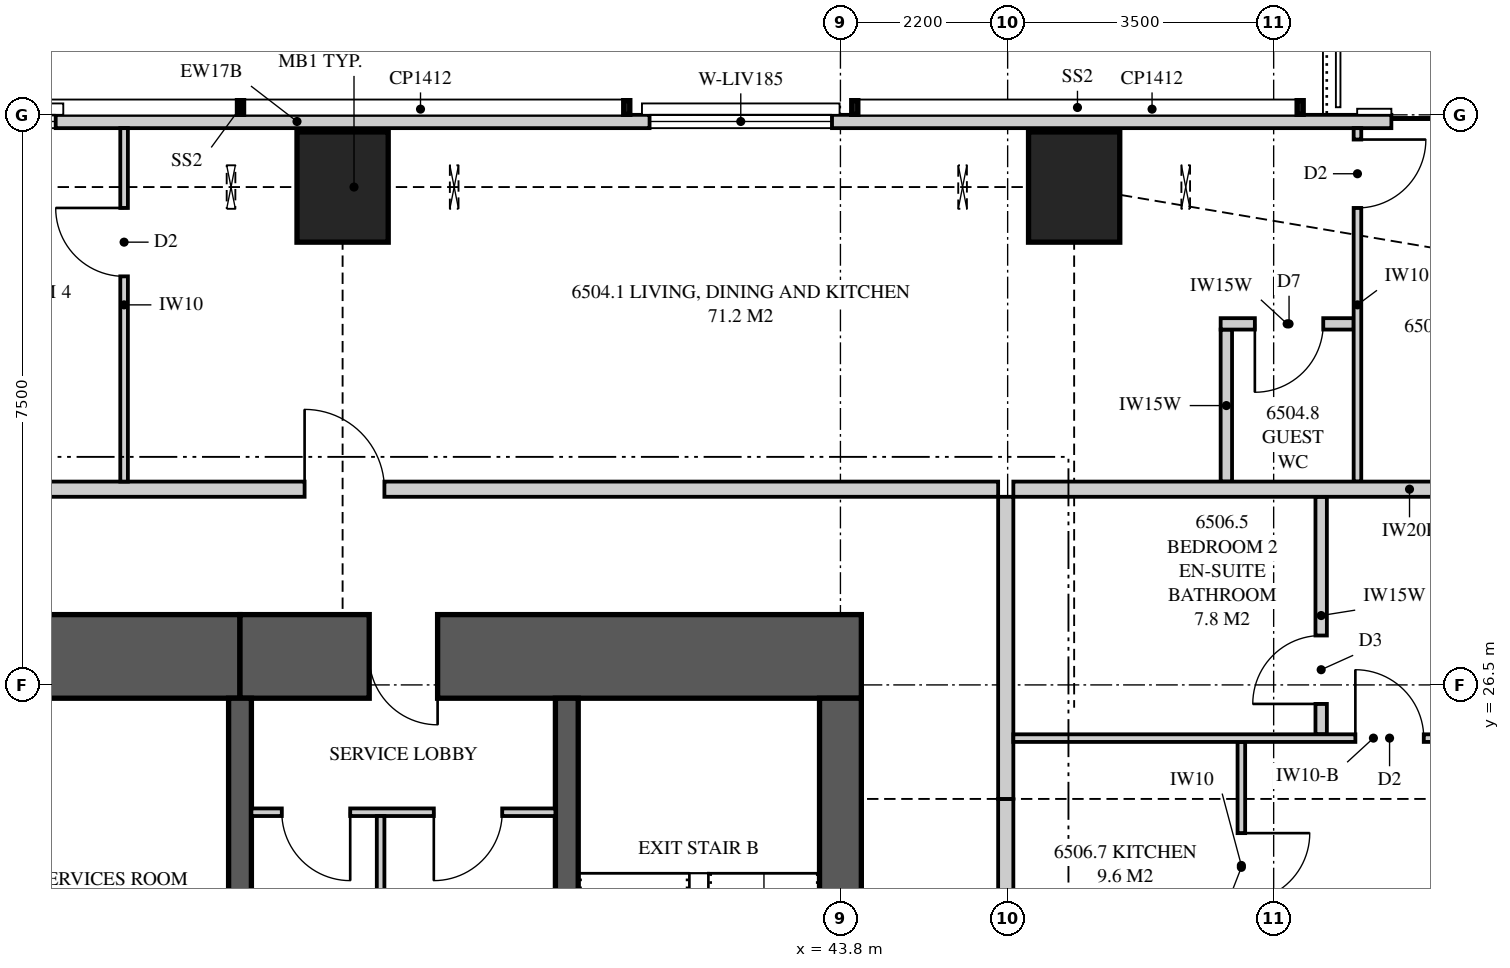
"""IFC4 building model, lengths in metres.
Left out: names, types, materials, properties, quantities, classifications, styles, units other than length and angle.
Written with IfcOpenShell. Run it as: python <this file> out.ifc"""

import sys

from ifc_helpers import new_model, si_unit, direction, frame, frame_2d, origin, origin_2d, place, context, subcontext, project, spatial, polyline, rectangle, outline, extrude, element, fill, save


model = new_model("IFC4")
c1 = context("Model", 3, precision=1e-05, world=origin(), true_north=direction((0.0, 1.0)))
c2 = subcontext(c1, "Body", "Model", "MODEL_VIEW")
j1 = project(units=[si_unit("LENGTHUNIT", "METRE"), si_unit("PLANEANGLEUNIT", "RADIAN")], contexts=[c1])
p1 = place(None, origin())
s1 = spatial("IfcSite", under=j1, at=p1, CompositionType="ELEMENT")
p2 = place(p1, origin())
s2 = spatial("IfcBuilding", under=s1, at=p2, CompositionType="ELEMENT")
p3 = place(p2, frame((0.0, 0.0, 238.95)))
s3 = spatial("IfcBuildingStorey", under=s2, at=p3, CompositionType="ELEMENT", Elevation=238.95)
for number, where, z_axis, x_axis in (
    (1, (46.875, 33.05, 0.0), (0.0, 0.0, 1.0), (0.0, 1.0, 0.0)),
    (2, (37.25, 33.05, 0.0), (0.0, 0.0, 1.0), (0.0, 1.0, 0.0)),
):
    element("IfcColumn", number, at=place(p3, frame(where, z_axis=z_axis, x_axis=x_axis)), inside=s3, PredefinedType="COLUMN", context=c2, shape_type="SweptSolid", body=[
        extrude(rectangle(XDim=1.45, YDim=1.2, at=origin_2d()), origin(), (0.0, 0.0, 1.0), 3.5),
    ])
p4 = place(p3, frame((44.075, 26.875, 0.0), z_axis=(0.0, 0.0, 1.0), x_axis=(-1.0, 0.0, 0.0)))
e3 = element("IfcWall", 3, at=p4, inside=s3, PredefinedType="SHEAR", context=c2, shape_type="SweptSolid", body=[
    extrude(rectangle(XDim=8.175, YDim=1.1, at=frame_2d((4.087, 0.0))), origin(), (0.0, 0.0, 1.0), 3.5),
])
p5 = place(p4, frame((5.575, 0.0, 0.0)))
e4 = element("IfcOpeningElement", 4, at=p5, cuts=e3, PredefinedType="OPENING", context=c2, shape_type="SweptSolid", body=[
    extrude(rectangle(XDim=0.9, YDim=2.1, at=frame_2d((0.45, 1.05))), frame((0.0, 0.56, 0.0), z_axis=(0.0, -1.0, 0.0), x_axis=(1.0, 0.0, 0.0)), (0.0, 0.0, 1.0), 1.12),
])
p6 = place(p3, frame((35.9, 26.875, 0.0), z_axis=(0.0, 0.0, 1.0), x_axis=(-1.0, 0.0, 0.0)))
e5 = element("IfcWall", 5, at=p6, inside=s3, PredefinedType="SHEAR", context=c2, shape_type="SweptSolid", body=[
    extrude(rectangle(XDim=4.3, YDim=1.1, at=frame_2d((2.15, 0.0))), origin(), (0.0, 0.0, 1.0), 3.5),
])
p7 = place(p3, frame((43.8, 19.3, 0.0), z_axis=(0.0, 0.0, 1.0), x_axis=(0.0, 1.0, 0.0)))
e6 = element("IfcWall", 6, at=p7, inside=s3, PredefinedType="SHEAR", context=c2, shape_type="SweptSolid", body=[
    extrude(rectangle(XDim=7.025, YDim=0.55, at=frame_2d((3.512, 0.0))), origin(), (0.0, 0.0, 1.0), 3.5),
])
p8 = place(p3, frame((35.9, 22.5, 0.0), z_axis=(0.0, 0.0, 1.0), x_axis=(0.0, 1.0, 0.0)))
e7 = element("IfcWall", 7, at=p8, inside=s3, PredefinedType="SHEAR", context=c2, shape_type="SweptSolid", body=[
    extrude(rectangle(XDim=3.825, YDim=0.3, at=frame_2d((1.913, 0.0))), origin(), (0.0, 0.0, 1.0), 3.5),
])
p9 = place(p3, frame((40.2, 18.5, 0.0), z_axis=(0.0, 0.0, 1.0), x_axis=(0.0, 1.0, 0.0)))
e8 = element("IfcWall", 8, at=p9, inside=s3, PredefinedType="SHEAR", context=c2, shape_type="SweptSolid", body=[
    extrude(rectangle(XDim=7.825, YDim=0.3, at=frame_2d((3.913, 0.0))), origin(), (0.0, 0.0, 1.0), 3.5),
])
p10 = place(p3, frame((53.449, 33.913, 0.0), z_axis=(0.0, 0.0, 1.0), x_axis=(-1.0, 0.0, 0.0)))
e9 = element("IfcWall", 9, at=p10, inside=s3, PredefinedType="SOLIDWALL", context=c2, shape_type="SweptSolid", body=[
    extrude(outline(polyline([(0.0, 0.0), (33.597, 0.0), (33.597, 3.26), (26.039, 3.26), (26.039, 2.3), (25.955, 2.3), (25.955, 3.26), (25.824, 3.26), (25.824, 2.3), (6.574, 2.3), (6.574, 3.26), (6.442, 3.26), (6.442, 2.3), (6.359, 2.3), (6.359, 3.26), (0.0, 3.26), (0.0, 0.0)])), frame((0.0, 0.087, 0.0), z_axis=(0.0, -1.0, 0.0), x_axis=(1.0, 0.0, 0.0)), (0.0, 0.0, 1.0), 0.175),
])
p11 = place(p10, frame((0.6, 0.0, 0.0)))
e10 = element("IfcOpeningElement", 10, at=p11, cuts=e9, PredefinedType="OPENING", context=c2, shape_type="SweptSolid", body=[
    extrude(rectangle(XDim=1.8, YDim=2.25, at=frame_2d((0.9, 1.125))), frame((0.0, 0.097, 0.0), z_axis=(0.0, -1.0, 0.0), x_axis=(1.0, 0.0, 0.0)), (0.0, 0.0, 1.0), 0.195),
])
p12 = place(p10, frame((9.76, 0.0, 0.4)))
e11 = element("IfcOpeningElement", 11, at=p12, cuts=e9, PredefinedType="OPENING", context=c2, shape_type="SweptSolid", body=[
    extrude(rectangle(XDim=2.4, YDim=1.85, at=frame_2d((1.2, 0.925))), frame((0.0, 0.097, 0.0), z_axis=(0.0, -1.0, 0.0), x_axis=(1.0, 0.0, 0.0)), (0.0, 0.0, 1.0), 0.195),
])
p13 = place(p10, frame((19.974, 0.0, 0.4)))
e12 = element("IfcOpeningElement", 12, at=p13, cuts=e9, PredefinedType="OPENING", context=c2, shape_type="SweptSolid", body=[
    extrude(rectangle(XDim=1.8, YDim=1.85, at=frame_2d((0.9, 0.925))), frame((0.0, 0.097, 0.0), z_axis=(0.0, -1.0, 0.0), x_axis=(1.0, 0.0, 0.0)), (0.0, 0.0, 1.0), 0.195),
])
p14 = place(p10, frame((23.144, 0.0, 0.4)))
e13 = element("IfcOpeningElement", 13, at=p14, cuts=e9, PredefinedType="OPENING", context=c2, shape_type="SweptSolid", body=[
    extrude(rectangle(XDim=1.8, YDim=1.85, at=frame_2d((0.9, 0.925))), frame((0.0, 0.097, 0.0), z_axis=(0.0, -1.0, 0.0), x_axis=(1.0, 0.0, 0.0)), (0.0, 0.0, 1.0), 0.195),
])
p15 = place(p10, frame((29.273, 0.0, 0.4)))
e14 = element("IfcOpeningElement", 14, at=p15, cuts=e9, PredefinedType="OPENING", context=c2, shape_type="SweptSolid", body=[
    extrude(rectangle(XDim=1.8, YDim=1.85, at=frame_2d((0.9, 0.925))), frame((0.0, 0.097, 0.0), z_axis=(0.0, -1.0, 0.0), x_axis=(1.0, 0.0, 0.0)), (0.0, 0.0, 1.0), 0.195),
])
p16 = place(p3, frame((18.0, 29.075, 0.0), z_axis=(0.0, 0.0, 1.0), x_axis=(1.0, 0.0, 0.0)))
e15 = element("IfcWall", 15, at=p16, inside=s3, PredefinedType="PARTITIONING", context=c2, shape_type="SweptSolid", body=[
    extrude(outline(polyline([(0.0, 0.0), (27.875, 0.0), (27.875, 3.26), (27.875, 2.66), (27.565, 2.66), (27.565, 3.26), (20.56, 3.26), (20.56, 2.66), (17.94, 2.66), (17.94, 3.26), (10.935, 3.26), (10.935, 2.66), (8.315, 2.66), (8.315, 3.26), (2.192, 3.26), (2.192, 2.3), (0.256, 2.3), (0.256, 3.26), (0.0, 3.26), (0.0, 0.0)])), frame((0.0, 0.1, 0.0), z_axis=(0.0, -1.0, 0.0), x_axis=(1.0, 0.0, 0.0)), (0.0, 0.0, 1.0), 0.2),
])
p17 = place(p16, frame((18.75, 0.0, 0.0)))
e16 = element("IfcOpeningElement", 16, at=p17, cuts=e15, PredefinedType="OPENING", context=c2, shape_type="SweptSolid", body=[
    extrude(rectangle(XDim=1.05, YDim=2.2, at=frame_2d((0.525, 1.1))), frame((0.0, 0.11, 0.0), z_axis=(0.0, -1.0, 0.0), x_axis=(1.0, 0.0, 0.0)), (0.0, 0.0, 1.0), 0.22),
])
p18 = place(p3, frame((34.375, 33.825, 0.0), z_axis=(0.0, 0.0, 1.0), x_axis=(0.0, -1.0, 0.0)))
e17 = element("IfcWall", 17, at=p18, inside=s3, PredefinedType="PARTITIONING", context=c2, shape_type="SweptSolid", body=[
    extrude(outline(polyline([(0.0, 0.0), (4.65, 0.0), (4.65, 3.26), (1.635, 3.26), (1.635, 2.3), (0.0, 2.3), (0.0, 3.26), (0.0, 0.0)])), frame((0.0, 0.05, 0.0), z_axis=(0.0, -1.0, 0.0), x_axis=(1.0, 0.0, 0.0)), (0.0, 0.0, 1.0), 0.1),
])
p19 = place(p18, frame((1.05, 0.0, 0.0)))
e18 = element("IfcOpeningElement", 18, at=p19, cuts=e17, PredefinedType="OPENING", context=c2, shape_type="SweptSolid", body=[
    extrude(rectangle(XDim=0.9, YDim=2.1, at=frame_2d((0.45, 1.05))), frame((0.0, 0.06, 0.0), z_axis=(0.0, -1.0, 0.0), x_axis=(1.0, 0.0, 0.0)), (0.0, 0.0, 1.0), 0.12),
])
p20 = place(p3, frame((50.603, 33.825, 0.0), z_axis=(0.0, 0.0, 1.0), x_axis=(0.0, -1.0, 0.0)))
e19 = element("IfcWall", 19, at=p20, inside=s3, PredefinedType="PARTITIONING", context=c2, shape_type="SweptSolid", body=[
    extrude(outline(polyline([(0.0, 0.0), (4.65, 0.0), (4.65, 3.26), (2.279, 3.26), (2.279, 2.3), (0.534, 2.3), (0.534, 3.26), (0.0, 3.26), (0.0, 0.0)])), frame((0.0, 0.05, 0.0), z_axis=(0.0, -1.0, 0.0), x_axis=(1.0, 0.0, 0.0)), (0.0, 0.0, 1.0), 0.1),
])
p21 = place(p20, frame((0.15, 0.0, 0.0)))
e20 = element("IfcOpeningElement", 20, at=p21, cuts=e19, PredefinedType="OPENING", context=c2, shape_type="SweptSolid", body=[
    extrude(rectangle(XDim=0.9, YDim=2.1, at=frame_2d((0.45, 1.05))), frame((0.0, 0.06, 0.0), z_axis=(0.0, -1.0, 0.0), x_axis=(1.0, 0.0, 0.0)), (0.0, 0.0, 1.0), 0.12),
])
p22 = place(p3, frame((46.075, 29.075, 0.0), z_axis=(0.0, 0.0, 1.0), x_axis=(1.0, 0.0, 0.0)))
e21 = element("IfcWall", 21, at=p22, inside=s3, PredefinedType="PARTITIONING", context=c2, shape_type="SweptSolid", body=[
    extrude(outline(polyline([(0.0, 0.0), (10.425, 0.0), (10.425, 3.26), (9.646, 3.26), (9.646, 2.3), (7.795, 2.3), (7.795, 3.26), (2.11, 3.26), (2.11, 2.66), (0.0, 2.66), (0.0, 3.26), (0.0, 0.0)])), frame((0.0, 0.1, 0.0), z_axis=(0.0, -1.0, 0.0), x_axis=(1.0, 0.0, 0.0)), (0.0, 0.0, 1.0), 0.2),
])
p23 = place(p3, frame((45.975, 14.25, 0.0), z_axis=(0.0, 0.0, 1.0), x_axis=(0.0, 1.0, 0.0)))
e22 = element("IfcWall", 22, at=p23, inside=s3, PredefinedType="PARTITIONING", context=c2, shape_type="SweptSolid", body=[
    extrude(outline(polyline([(0.0, 0.0), (10.75, 0.0), (10.75, 2.66), (9.44, 2.66), (9.44, 3.26), (5.81, 3.26), (5.81, 2.66), (3.19, 2.66), (3.19, 3.26), (0.06, 3.26), (0.06, 2.66), (0.0, 2.66), (0.0, 0.0)])), frame((0.0, 0.1, 0.0), z_axis=(0.0, -1.0, 0.0), x_axis=(1.0, 0.0, 0.0)), (0.0, 0.0, 1.0), 0.2),
])
p24 = place(p23, frame((6.863, 0.0, 0.0)))
e23 = element("IfcOpeningElement", 23, at=p24, cuts=e22, PredefinedType="OPENING", context=c2, shape_type="SweptSolid", body=[
    extrude(rectangle(XDim=1.05, YDim=2.2, at=frame_2d((0.525, 1.1))), frame((0.0, 0.11, 0.0), z_axis=(0.0, -1.0, 0.0), x_axis=(1.0, 0.0, 0.0)), (0.0, 0.0, 1.0), 0.22),
])
p25 = place(p3, frame((45.975, 25.0, 0.0), z_axis=(0.0, 0.0, 1.0), x_axis=(0.0, 1.0, 0.0)))
e24 = element("IfcWall", 24, at=p25, inside=s3, PredefinedType="PARTITIONING", context=c2, shape_type="SweptSolid", body=[
    extrude(rectangle(XDim=3.975, YDim=0.2, at=frame_2d((1.988, 0.0))), origin(), (0.0, 0.0, 1.0), 2.66),
])
p26 = place(p3, frame((55.55, 25.8, 0.0), z_axis=(0.0, 0.0, 1.0), x_axis=(-1.0, 0.0, 0.0)))
e25 = element("IfcWall", 25, at=p26, inside=s3, PredefinedType="PARTITIONING", context=c2, shape_type="SweptSolid", body=[
    extrude(outline(polyline([(0.0, 0.0), (9.475, 0.0), (9.475, 2.66), (1.023, 2.66), (1.023, 2.3), (0.0, 2.3), (0.0, 0.0)])), frame((0.0, 0.05, 0.0), z_axis=(0.0, -1.0, 0.0), x_axis=(1.0, 0.0, 0.0)), (0.0, 0.0, 1.0), 0.1),
])
p27 = place(p26, frame((4.075, 0.0, 0.0)))
e26 = element("IfcOpeningElement", 26, at=p27, cuts=e25, PredefinedType="OPENING", context=c2, shape_type="SweptSolid", body=[
    extrude(rectangle(XDim=0.9, YDim=2.1, at=frame_2d((0.45, 1.05))), frame((0.0, 0.06, 0.0), z_axis=(0.0, -1.0, 0.0), x_axis=(1.0, 0.0, 0.0)), (0.0, 0.0, 1.0), 0.12),
])
p28 = place(p3, frame((50.125, 25.85, 0.0), z_axis=(0.0, 0.0, 1.0), x_axis=(0.0, 1.0, 0.0)))
e27 = element("IfcWall", 27, at=p28, inside=s3, PredefinedType="PLUMBINGWALL", context=c2, shape_type="SweptSolid", body=[
    extrude(outline(polyline([(0.0, 0.0), (3.125, 0.0), (3.125, 3.26), (0.435, 3.26), (0.435, 2.66), (0.0, 2.66), (0.0, 3.26), (0.0, 0.0)])), frame((0.0, 0.075, 0.0), z_axis=(0.0, -1.0, 0.0), x_axis=(1.0, 0.0, 0.0)), (0.0, 0.0, 1.0), 0.15),
])
p29 = place(p28, frame((0.4, 0.0, 0.0)))
e28 = element("IfcOpeningElement", 28, at=p29, cuts=e27, PredefinedType="OPENING", context=c2, shape_type="SweptSolid", body=[
    extrude(rectangle(XDim=0.9, YDim=2.1, at=frame_2d((0.45, 1.05))), frame((0.0, 0.085, 0.0), z_axis=(0.0, -1.0, 0.0), x_axis=(1.0, 0.0, 0.0)), (0.0, 0.0, 1.0), 0.17),
])
p30 = place(p3, frame((49.075, 22.5, 0.0), z_axis=(0.0, 0.0, 1.0), x_axis=(0.0, 1.0, 0.0)))
e29 = element("IfcWall", 29, at=p30, inside=s3, PredefinedType="PARTITIONING", context=c2, shape_type="SweptSolid", body=[
    extrude(outline(polyline([(0.0, 0.0), (3.25, 0.0), (3.25, 3.26), (3.25, 2.66), (1.24, 2.66), (1.24, 3.26), (0.0, 3.26), (0.0, 0.0)])), frame((0.0, 0.05, 0.0), z_axis=(0.0, -1.0, 0.0), x_axis=(1.0, 0.0, 0.0)), (0.0, 0.0, 1.0), 0.1),
])
p31 = place(p30, frame((1.15, 0.0, 0.0)))
e30 = element("IfcOpeningElement", 30, at=p31, cuts=e29, PredefinedType="OPENING", context=c2, shape_type="SweptSolid", body=[
    extrude(rectangle(XDim=0.9, YDim=2.1, at=frame_2d((0.45, 1.05))), frame((0.0, 0.06, 0.0), z_axis=(0.0, -1.0, 0.0), x_axis=(1.0, 0.0, 0.0)), (0.0, 0.0, 1.0), 0.12),
])
p32 = place(p3, frame((50.552, 31.25, 0.0), z_axis=(0.0, 0.0, 1.0), x_axis=(-1.0, 0.0, 0.0)))
e31 = element("IfcWall", 31, at=p32, inside=s3, PredefinedType="PLUMBINGWALL", context=c2, shape_type="SweptSolid", body=[
    extrude(rectangle(XDim=1.75, YDim=0.15, at=frame_2d((0.875, 0.0))), origin(), (0.0, 0.0, 1.0), 3.26),
])
p33 = place(p32, frame((0.4, 0.0, 0.0)))
e32 = element("IfcOpeningElement", 32, at=p33, cuts=e31, PredefinedType="OPENING", context=c2, shape_type="SweptSolid", body=[
    extrude(rectangle(XDim=0.9, YDim=2.1, at=frame_2d((0.45, 1.05))), frame((0.0, 0.085, 0.0), z_axis=(0.0, -1.0, 0.0), x_axis=(1.0, 0.0, 0.0)), (0.0, 0.0, 1.0), 0.17),
])
p34 = place(p3, frame((48.877, 29.175, 0.0), z_axis=(0.0, 0.0, 1.0), x_axis=(0.0, 1.0, 0.0)))
e33 = element("IfcWall", 33, at=p34, inside=s3, PredefinedType="PLUMBINGWALL", context=c2, shape_type="SweptSolid", body=[
    extrude(rectangle(XDim=2.0, YDim=0.15, at=frame_2d((1.0, 0.0))), origin(), (0.0, 0.0, 1.0), 3.26),
])
p35 = place(p3, frame((36.05, 24.825, 0.0), z_axis=(0.0, 0.0, 1.0), x_axis=(1.0, 0.0, 0.0)))
e34 = element("IfcWall", 34, at=p35, inside=s3, PredefinedType="PARTITIONING", context=c2, shape_type="SweptSolid", body=[
    extrude(rectangle(XDim=4.0, YDim=0.1, at=frame_2d((2.0, 0.0))), origin(), (0.0, 0.0, 1.0), 3.26),
])
p36 = place(p35, frame((0.4, 0.0, 0.0)))
e35 = element("IfcOpeningElement", 35, at=p36, cuts=e34, PredefinedType="OPENING", context=c2, shape_type="SweptSolid", body=[
    extrude(rectangle(XDim=0.9, YDim=2.1, at=frame_2d((0.45, 1.05))), frame((0.0, 0.06, 0.0), z_axis=(0.0, -1.0, 0.0), x_axis=(1.0, 0.0, 0.0)), (0.0, 0.0, 1.0), 0.12),
])
p37 = place(p35, frame((2.4, 0.0, 0.0)))
e36 = element("IfcOpeningElement", 36, at=p37, cuts=e34, PredefinedType="OPENING", context=c2, shape_type="SweptSolid", body=[
    extrude(rectangle(XDim=0.9, YDim=2.1, at=frame_2d((0.45, 1.05))), frame((0.0, 0.06, 0.0), z_axis=(0.0, -1.0, 0.0), x_axis=(1.0, 0.0, 0.0)), (0.0, 0.0, 1.0), 0.12),
])
p38 = place(p3, frame((37.75, 18.65, 0.0), z_axis=(0.0, 0.0, 1.0), x_axis=(0.0, 1.0, 0.0)))
e37 = element("IfcWall", 37, at=p38, inside=s3, PredefinedType="PARTITIONING", context=c2, shape_type="SweptSolid", body=[
    extrude(rectangle(XDim=6.125, YDim=0.1, at=frame_2d((3.062, 0.0))), origin(), (0.0, 0.0, 1.0), 3.26),
])
p39 = place(p11, origin())
e38 = element("IfcDoor", 38, at=p39, inside=s3, OperationType="SLIDING_TO_LEFT", PredefinedType="DOOR", context=c2, shape_type="SweptSolid", body=[
    extrude(rectangle(XDim=1.8, YDim=2.25, at=frame_2d((0.9, 1.125))), frame((0.0, 0.025, 0.0), z_axis=(0.0, -1.0, 0.0), x_axis=(1.0, 0.0, 0.0)), (0.0, 0.0, 1.0), 0.05),
])
fill(e10, e38)
p40 = place(p12, origin())
e39 = element("IfcWindow", 39, at=p40, inside=s3, PartitioningType="SINGLE_PANEL", PredefinedType="WINDOW", context=c2, shape_type="SweptSolid", body=[
    extrude(rectangle(XDim=2.4, YDim=1.85, at=frame_2d((1.2, 0.925))), frame((0.0, 0.03, 0.0), z_axis=(0.0, -1.0, 0.0), x_axis=(1.0, 0.0, 0.0)), (0.0, 0.0, 1.0), 0.06),
])
fill(e11, e39)
p41 = place(p13, origin())
e40 = element("IfcWindow", 40, at=p41, inside=s3, PartitioningType="SINGLE_PANEL", PredefinedType="WINDOW", context=c2, shape_type="SweptSolid", body=[
    extrude(rectangle(XDim=1.8, YDim=1.85, at=frame_2d((0.9, 0.925))), frame((0.0, 0.03, 0.0), z_axis=(0.0, -1.0, 0.0), x_axis=(1.0, 0.0, 0.0)), (0.0, 0.0, 1.0), 0.06),
])
fill(e12, e40)
p42 = place(p17, origin())
e41 = element("IfcDoor", 41, at=p42, inside=s3, OperationType="SINGLE_SWING_LEFT", PredefinedType="DOOR", context=c2, shape_type="SweptSolid", body=[
    extrude(rectangle(XDim=1.05, YDim=2.2, at=frame_2d((0.525, 1.1))), frame((0.0, 0.025, 0.0), z_axis=(0.0, -1.0, 0.0), x_axis=(1.0, 0.0, 0.0)), (0.0, 0.0, 1.0), 0.05),
])
fill(e16, e41)
p43 = place(p19, frame((0.9, 0.0, 0.0), z_axis=(0.0, 0.0, 1.0), x_axis=(-1.0, 0.0, 0.0)))
e42 = element("IfcDoor", 42, at=p43, inside=s3, OperationType="SINGLE_SWING_RIGHT", PredefinedType="DOOR", context=c2, shape_type="SweptSolid", body=[
    extrude(rectangle(XDim=0.9, YDim=2.1, at=frame_2d((0.45, 1.05))), frame((0.0, 0.025, 0.0), z_axis=(0.0, -1.0, 0.0), x_axis=(1.0, 0.0, 0.0)), (0.0, 0.0, 1.0), 0.05),
])
fill(e18, e42)
p44 = place(p21, origin())
e43 = element("IfcDoor", 43, at=p44, inside=s3, OperationType="SINGLE_SWING_LEFT", PredefinedType="DOOR", context=c2, shape_type="SweptSolid", body=[
    extrude(rectangle(XDim=0.9, YDim=2.1, at=frame_2d((0.45, 1.05))), frame((0.0, 0.025, 0.0), z_axis=(0.0, -1.0, 0.0), x_axis=(1.0, 0.0, 0.0)), (0.0, 0.0, 1.0), 0.05),
])
fill(e20, e43)
p45 = place(p27, frame((0.9, 0.0, 0.0), z_axis=(0.0, 0.0, 1.0), x_axis=(-1.0, 0.0, 0.0)))
e44 = element("IfcDoor", 44, at=p45, inside=s3, OperationType="SINGLE_SWING_LEFT", PredefinedType="DOOR", context=c2, shape_type="SweptSolid", body=[
    extrude(rectangle(XDim=0.9, YDim=2.1, at=frame_2d((0.45, 1.05))), frame((0.0, 0.025, 0.0), z_axis=(0.0, -1.0, 0.0), x_axis=(1.0, 0.0, 0.0)), (0.0, 0.0, 1.0), 0.05),
])
fill(e26, e44)
p46 = place(p29, origin())
e45 = element("IfcDoor", 45, at=p46, inside=s3, OperationType="SINGLE_SWING_LEFT", PredefinedType="DOOR", context=c2, shape_type="SweptSolid", body=[
    extrude(rectangle(XDim=0.9, YDim=2.1, at=frame_2d((0.45, 1.05))), frame((0.0, 0.025, 0.0), z_axis=(0.0, -1.0, 0.0), x_axis=(1.0, 0.0, 0.0)), (0.0, 0.0, 1.0), 0.05),
])
fill(e28, e45)
p47 = place(p31, frame((0.9, 0.0, 0.0), z_axis=(0.0, 0.0, 1.0), x_axis=(-1.0, 0.0, 0.0)))
e46 = element("IfcDoor", 46, at=p47, inside=s3, OperationType="SINGLE_SWING_LEFT", PredefinedType="DOOR", context=c2, shape_type="SweptSolid", body=[
    extrude(rectangle(XDim=0.9, YDim=2.1, at=frame_2d((0.45, 1.05))), frame((0.0, 0.025, 0.0), z_axis=(0.0, -1.0, 0.0), x_axis=(1.0, 0.0, 0.0)), (0.0, 0.0, 1.0), 0.05),
])
fill(e30, e46)
p48 = place(p33, origin())
e47 = element("IfcDoor", 47, at=p48, inside=s3, OperationType="SINGLE_SWING_RIGHT", PredefinedType="DOOR", context=c2, shape_type="SweptSolid", body=[
    extrude(rectangle(XDim=0.9, YDim=2.1, at=frame_2d((0.45, 1.05))), frame((0.0, 0.025, 0.0), z_axis=(0.0, -1.0, 0.0), x_axis=(1.0, 0.0, 0.0)), (0.0, 0.0, 1.0), 0.05),
])
fill(e32, e47)
p49 = place(p36, frame((0.9, 0.0, 0.0), z_axis=(0.0, 0.0, 1.0), x_axis=(-1.0, 0.0, 0.0)))
e48 = element("IfcDoor", 48, at=p49, inside=s3, OperationType="SINGLE_SWING_LEFT", PredefinedType="DOOR", context=c2, shape_type="SweptSolid", body=[
    extrude(rectangle(XDim=0.9, YDim=2.1, at=frame_2d((0.45, 1.05))), frame((0.0, 0.025, 0.0), z_axis=(0.0, -1.0, 0.0), x_axis=(1.0, 0.0, 0.0)), (0.0, 0.0, 1.0), 0.05),
])
fill(e35, e48)
p50 = place(p37, frame((0.9, 0.0, 0.0), z_axis=(0.0, 0.0, 1.0), x_axis=(-1.0, 0.0, 0.0)))
e49 = element("IfcDoor", 49, at=p50, inside=s3, OperationType="SINGLE_SWING_RIGHT", PredefinedType="DOOR", context=c2, shape_type="SweptSolid", body=[
    extrude(rectangle(XDim=0.9, YDim=2.1, at=frame_2d((0.45, 1.05))), frame((0.0, 0.025, 0.0), z_axis=(0.0, -1.0, 0.0), x_axis=(1.0, 0.0, 0.0)), (0.0, 0.0, 1.0), 0.05),
])
fill(e36, e49)
p51 = place(p5, origin())
e50 = element("IfcDoor", 50, at=p51, inside=s3, OperationType="SINGLE_SWING_LEFT", PredefinedType="DOOR", context=c2, shape_type="SweptSolid", body=[
    extrude(rectangle(XDim=0.9, YDim=2.1, at=frame_2d((0.45, 1.05))), frame((0.0, 0.47, 0.0), z_axis=(0.0, -1.0, 0.0), x_axis=(1.0, 0.0, 0.0)), (0.0, 0.0, 1.0), 0.8),
])
fill(e4, e50)
save(model, sys.argv[1])
